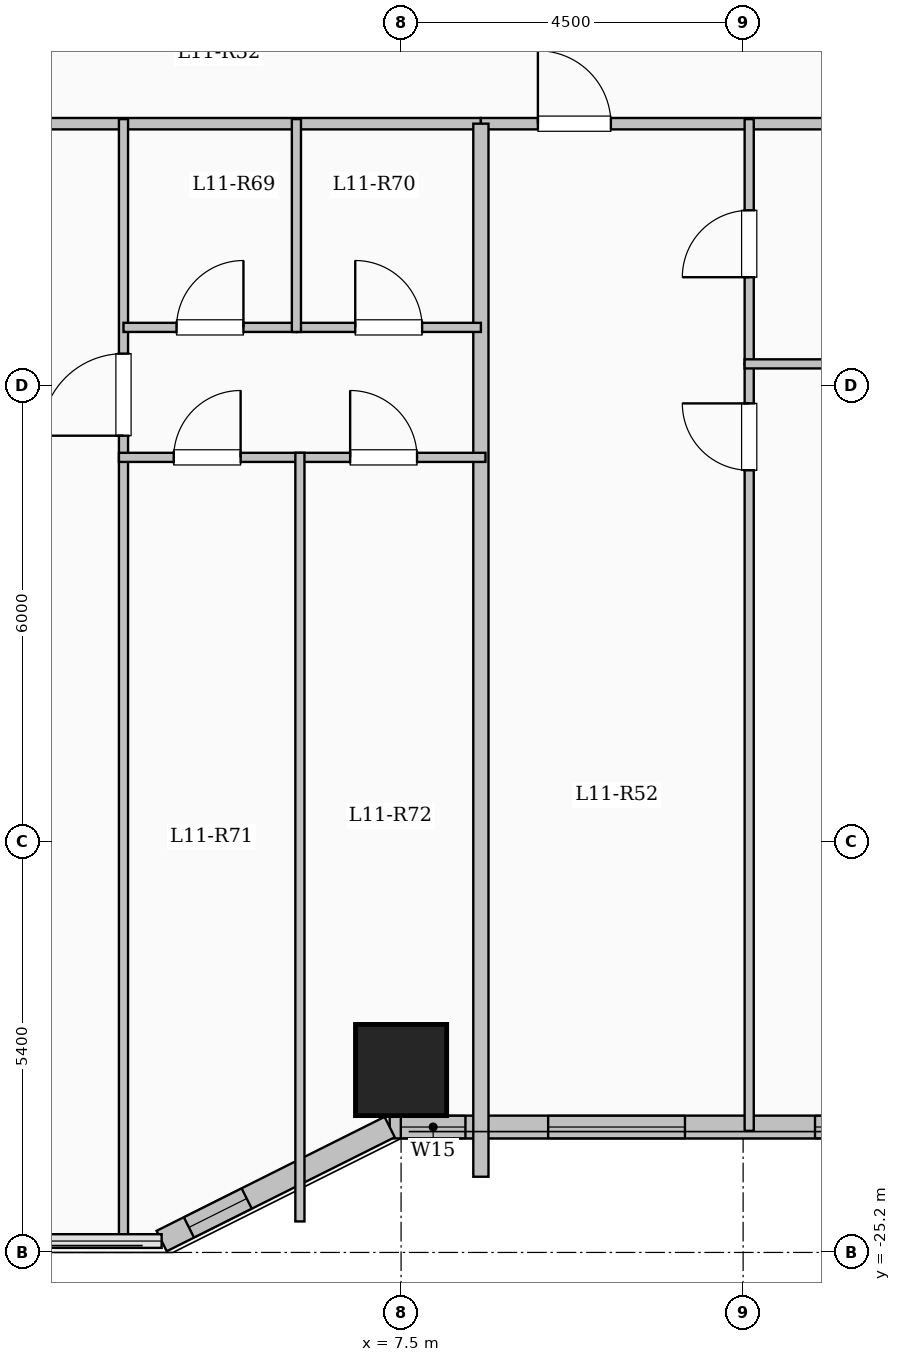
"""IFC4 building model, lengths in metres.
Left out: names, types, materials, properties, quantities, classifications, styles, units other than length and angle.
Written with IfcOpenShell. Run it as: python <this file> out.ifc"""

import sys

from ifc_helpers import new_model, si_unit, direction, frame, frame_2d, origin, origin_2d, place, context, subcontext, project, spatial, rectangle, extrude, element, fill, save


model = new_model("IFC4")
c1 = context("Model", 3, precision=1e-05, world=origin(), true_north=direction((0.0, 1.0)))
c2 = subcontext(c1, "Body", "Model", "MODEL_VIEW")
j1 = project(units=[si_unit("LENGTHUNIT", "METRE"), si_unit("PLANEANGLEUNIT", "RADIAN")], contexts=[c1])
p1 = place(None, origin())
s1 = spatial("IfcSite", under=j1, at=p1, CompositionType="ELEMENT")
p2 = place(p1, origin())
s2 = spatial("IfcBuilding", under=s1, at=p2, CompositionType="ELEMENT")
p3 = place(p2, frame((0.0, 0.0, 44.1)))
s3 = spatial("IfcBuildingStorey", under=s2, at=p3, CompositionType="ELEMENT", Elevation=44.1)
p4 = place(p3, frame((7.5, -22.8, 0.0), z_axis=(0.0, 0.0, 1.0), x_axis=(1.0, 0.0, 0.0)))
e1 = element("IfcColumn", 1, at=p4, inside=s3, PredefinedType="COLUMN", context=c2, shape_type="SweptSolid", body=[
    extrude(rectangle(XDim=1.2, YDim=1.2, at=origin_2d()), origin(), (0.0, 0.0, 1.0), 3.35),
])
p5 = place(p3, frame((22.65, -23.55, 0.0), z_axis=(0.0, 0.0, 1.0), x_axis=(-1.0, 0.0, 0.0)))
e2 = element("IfcWall", 2, at=p5, inside=s3, PredefinedType="SOLIDWALL", context=c2, shape_type="SweptSolid", body=[
    extrude(rectangle(XDim=15.3, YDim=0.3, at=frame_2d((7.65, 0.0))), origin(), (0.0, 0.0, 1.0), 3.1),
])
p6 = place(p5, frame((0.509, 0.0, 0.95)))
e3 = element("IfcOpeningElement", 3, at=p6, cuts=e2, PredefinedType="OPENING", context=c2, shape_type="SweptSolid", body=[
    extrude(rectangle(XDim=1.2, YDim=1.5, at=frame_2d((0.6, 0.75))), frame((0.0, 0.16, 0.0), z_axis=(0.0, -1.0, 0.0), x_axis=(1.0, 0.0, 0.0)), (0.0, 0.0, 1.0), 0.32),
])
p7 = place(p5, frame((2.585, 0.0, 0.95)))
e4 = element("IfcOpeningElement", 4, at=p7, cuts=e2, PredefinedType="OPENING", context=c2, shape_type="SweptSolid", body=[
    extrude(rectangle(XDim=1.2, YDim=1.5, at=frame_2d((0.6, 0.75))), frame((0.0, 0.16, 0.0), z_axis=(0.0, -1.0, 0.0), x_axis=(1.0, 0.0, 0.0)), (0.0, 0.0, 1.0), 0.32),
])
p8 = place(p5, frame((5.019, 0.0, 0.9)))
e5 = element("IfcOpeningElement", 5, at=p8, cuts=e2, PredefinedType="OPENING", context=c2, shape_type="SweptSolid", body=[
    extrude(rectangle(XDim=1.5, YDim=1.65, at=frame_2d((0.75, 0.825))), frame((0.0, 0.16, 0.0), z_axis=(0.0, -1.0, 0.0), x_axis=(1.0, 0.0, 0.0)), (0.0, 0.0, 1.0), 0.32),
])
p9 = place(p5, frame((8.204, 0.0, 0.9)))
e6 = element("IfcOpeningElement", 6, at=p9, cuts=e2, PredefinedType="OPENING", context=c2, shape_type="SweptSolid", body=[
    extrude(rectangle(XDim=1.5, YDim=1.65, at=frame_2d((0.75, 0.825))), frame((0.0, 0.16, 0.0), z_axis=(0.0, -1.0, 0.0), x_axis=(1.0, 0.0, 0.0)), (0.0, 0.0, 1.0), 0.32),
])
p10 = place(p5, frame((11.415, 0.0, 0.9)))
e7 = element("IfcOpeningElement", 7, at=p10, cuts=e2, PredefinedType="OPENING", context=c2, shape_type="SweptSolid", body=[
    extrude(rectangle(XDim=1.8, YDim=1.65, at=frame_2d((0.9, 0.825))), frame((0.0, 0.16, 0.0), z_axis=(0.0, -1.0, 0.0), x_axis=(1.0, 0.0, 0.0)), (0.0, 0.0, 1.0), 0.32),
])
p11 = place(p5, frame((14.303, 0.0, 0.95)))
e8 = element("IfcOpeningElement", 8, at=p11, cuts=e2, PredefinedType="OPENING", context=c2, shape_type="SweptSolid", body=[
    extrude(rectangle(XDim=0.85, YDim=1.5, at=frame_2d((0.425, 0.75))), frame((0.0, 0.16, 0.0), z_axis=(0.0, -1.0, 0.0), x_axis=(1.0, 0.0, 0.0)), (0.0, 0.0, 1.0), 0.32),
])
p12 = place(p3, frame((7.35, -23.55, 0.0), z_axis=(0.0, 0.0, 1.0), x_axis=(-0.894427191, -0.4472135955, 0.0)))
e9 = element("IfcWall", 9, at=p12, inside=s3, PredefinedType="SOLIDWALL", context=c2, shape_type="SweptSolid", body=[
    extrude(rectangle(XDim=3.354, YDim=0.3, at=frame_2d((1.677, 0.0))), origin(), (0.0, 0.0, 1.0), 3.1),
])
p13 = place(p12, frame((2.103, 0.0, 0.95)))
e10 = element("IfcOpeningElement", 10, at=p13, cuts=e9, PredefinedType="OPENING", context=c2, shape_type="SweptSolid", body=[
    extrude(rectangle(XDim=0.85, YDim=1.5, at=frame_2d((0.425, 0.75))), frame((0.0, 0.16, 0.0), z_axis=(0.0, -1.0, 0.0), x_axis=(1.0, 0.0, 0.0)), (0.0, 0.0, 1.0), 0.32),
])
p14 = place(p3, frame((-8.55, -10.35, 0.0), z_axis=(0.0, 0.0, 1.0), x_axis=(1.0, 0.0, 0.0)))
e11 = element("IfcWall", 11, at=p14, inside=s3, PredefinedType="PARTITIONING", context=c2, shape_type="SweptSolid", body=[
    extrude(rectangle(XDim=17.1, YDim=0.15, at=frame_2d((8.55, 0.0))), origin(), (0.0, 0.0, 1.0), 3.1),
])
p15 = place(p14, frame((0.8, 0.0, 0.0)))
e12 = element("IfcOpeningElement", 12, at=p15, cuts=e11, PredefinedType="OPENING", context=c2, shape_type="SweptSolid", body=[
    extrude(rectangle(XDim=0.96, YDim=2.15, at=frame_2d((0.48, 1.075))), frame((0.0, 0.085, 0.0), z_axis=(0.0, -1.0, 0.0), x_axis=(1.0, 0.0, 0.0)), (0.0, 0.0, 1.0), 0.17),
])
p16 = place(p14, frame((8.495, 0.0, 0.0)))
e13 = element("IfcOpeningElement", 13, at=p16, cuts=e11, PredefinedType="OPENING", context=c2, shape_type="SweptSolid", body=[
    extrude(rectangle(XDim=0.96, YDim=2.15, at=frame_2d((0.48, 1.075))), frame((0.0, 0.085, 0.0), z_axis=(0.0, -1.0, 0.0), x_axis=(1.0, 0.0, 0.0)), (0.0, 0.0, 1.0), 0.17),
])
p17 = place(p3, frame((8.55, -10.35, 0.0), z_axis=(0.0, 0.0, 1.0), x_axis=(1.0, 0.0, 0.0)))
e14 = element("IfcWall", 14, at=p17, inside=s3, PredefinedType="PARTITIONING", context=c2, shape_type="SweptSolid", body=[
    extrude(rectangle(XDim=14.0, YDim=0.15, at=frame_2d((7.0, 0.0))), origin(), (0.0, 0.0, 1.0), 3.1),
])
p18 = place(p17, frame((0.75, 0.0, 0.0)))
e15 = element("IfcOpeningElement", 15, at=p18, cuts=e14, PredefinedType="OPENING", context=c2, shape_type="SweptSolid", body=[
    extrude(rectangle(XDim=0.96, YDim=2.15, at=frame_2d((0.48, 1.075))), frame((0.0, 0.085, 0.0), z_axis=(0.0, -1.0, 0.0), x_axis=(1.0, 0.0, 0.0)), (0.0, 0.0, 1.0), 0.17),
])
p19 = place(p17, frame((7.446, 0.0, 0.0)))
e16 = element("IfcOpeningElement", 16, at=p19, cuts=e14, PredefinedType="OPENING", context=c2, shape_type="SweptSolid", body=[
    extrude(rectangle(XDim=0.96, YDim=2.15, at=frame_2d((0.48, 1.075))), frame((0.0, 0.085, 0.0), z_axis=(0.0, -1.0, 0.0), x_axis=(1.0, 0.0, 0.0)), (0.0, 0.0, 1.0), 0.17),
])
p20 = place(p3, frame((12.08, -23.6, 0.0), z_axis=(0.0, 0.0, 1.0), x_axis=(0.0, 1.0, 0.0)))
e17 = element("IfcWall", 17, at=p20, inside=s3, PredefinedType="PARTITIONING", context=c2, shape_type="SweptSolid", body=[
    extrude(rectangle(XDim=10.09, YDim=0.12, at=frame_2d((5.045, 0.0))), origin(), (0.0, 0.0, 1.0), 3.1),
])
p21 = place(p20, frame((8.69, 0.0, 0.0)))
e18 = element("IfcOpeningElement", 18, at=p21, cuts=e17, PredefinedType="OPENING", context=c2, shape_type="SweptSolid", body=[
    extrude(rectangle(XDim=0.88, YDim=2.1, at=frame_2d((0.44, 1.05))), frame((0.0, 0.07, 0.0), z_axis=(0.0, -1.0, 0.0), x_axis=(1.0, 0.0, 0.0)), (0.0, 0.0, 1.0), 0.14),
])
p22 = place(p3, frame((12.08, -13.51, 0.0), z_axis=(0.0, 0.0, 1.0), x_axis=(0.0, 1.0, 0.0)))
e19 = element("IfcWall", 19, at=p22, inside=s3, PredefinedType="PARTITIONING", context=c2, shape_type="SweptSolid", body=[
    extrude(rectangle(XDim=3.22, YDim=0.12, at=frame_2d((1.61, 0.0))), origin(), (0.0, 0.0, 1.0), 3.1),
])
p23 = place(p22, frame((1.14, 0.0, 0.0)))
e20 = element("IfcOpeningElement", 20, at=p23, cuts=e19, PredefinedType="OPENING", context=c2, shape_type="SweptSolid", body=[
    extrude(rectangle(XDim=0.88, YDim=2.1, at=frame_2d((0.44, 1.05))), frame((0.0, 0.07, 0.0), z_axis=(0.0, -1.0, 0.0), x_axis=(1.0, 0.0, 0.0)), (0.0, 0.0, 1.0), 0.14),
])
p24 = place(p3, frame((12.02, -13.51, 0.0), z_axis=(0.0, 0.0, 1.0), x_axis=(1.0, 0.0, 0.0)))
e21 = element("IfcWall", 21, at=p24, inside=s3, PredefinedType="PARTITIONING", context=c2, shape_type="SweptSolid", body=[
    extrude(rectangle(XDim=3.336, YDim=0.12, at=frame_2d((1.668, 0.0))), origin(), (0.0, 0.0, 1.0), 3.1),
])
p25 = place(p3, frame((8.55, -24.204, 0.0), z_axis=(0.0, 0.0, 1.0), x_axis=(0.0, 1.0, 0.0)))
e22 = element("IfcWall", 22, at=p25, inside=s3, PredefinedType="SOLIDWALL", context=c2, shape_type="SweptSolid", body=[
    extrude(rectangle(XDim=13.854, YDim=0.2, at=frame_2d((6.927, 0.0))), origin(), (0.0, 0.0, 1.0), 3.1),
])
p26 = place(p3, frame((3.848, -25.08, 0.0), z_axis=(0.0, 0.0, 1.0), x_axis=(0.0, 1.0, 0.0)))
e23 = element("IfcWall", 23, at=p26, inside=s3, PredefinedType="PARTITIONING", context=c2, shape_type="SweptSolid", body=[
    extrude(rectangle(XDim=14.79, YDim=0.12, at=frame_2d((7.395, 0.0))), origin(), (0.0, 0.0, 1.0), 3.1),
])
p27 = place(p26, frame((10.625, 0.0, 0.0)))
e24 = element("IfcOpeningElement", 24, at=p27, cuts=e23, PredefinedType="OPENING", context=c2, shape_type="SweptSolid", body=[
    extrude(rectangle(XDim=1.08, YDim=2.15, at=frame_2d((0.54, 1.075))), frame((0.0, 0.07, 0.0), z_axis=(0.0, -1.0, 0.0), x_axis=(1.0, 0.0, 0.0)), (0.0, 0.0, 1.0), 0.14),
])
p28 = place(p3, frame((3.848, -13.03, 0.0), z_axis=(0.0, 0.0, 1.0), x_axis=(1.0, 0.0, 0.0)))
e25 = element("IfcWall", 25, at=p28, inside=s3, PredefinedType="PARTITIONING", context=c2, shape_type="SweptSolid", body=[
    extrude(rectangle(XDim=2.275, YDim=0.12, at=frame_2d((1.138, 0.0))), origin(), (0.0, 0.0, 1.0), 2.585),
])
p29 = place(p28, frame((0.698, 0.0, 0.0)))
e26 = element("IfcOpeningElement", 26, at=p29, cuts=e25, PredefinedType="OPENING", context=c2, shape_type="SweptSolid", body=[
    extrude(rectangle(XDim=0.88, YDim=2.1, at=frame_2d((0.44, 1.05))), frame((0.0, 0.07, 0.0), z_axis=(0.0, -1.0, 0.0), x_axis=(1.0, 0.0, 0.0)), (0.0, 0.0, 1.0), 0.14),
])
p30 = place(p3, frame((6.123, -13.03, 0.0), z_axis=(0.0, 0.0, 1.0), x_axis=(1.0, 0.0, 0.0)))
e27 = element("IfcWall", 27, at=p30, inside=s3, PredefinedType="PARTITIONING", context=c2, shape_type="SweptSolid", body=[
    extrude(rectangle(XDim=2.427, YDim=0.12, at=frame_2d((1.213, 0.0))), origin(), (0.0, 0.0, 1.0), 2.585),
])
p31 = place(p30, frame((0.774, 0.0, 0.0)))
e28 = element("IfcOpeningElement", 28, at=p31, cuts=e27, PredefinedType="OPENING", context=c2, shape_type="SweptSolid", body=[
    extrude(rectangle(XDim=0.88, YDim=2.1, at=frame_2d((0.44, 1.05))), frame((0.0, 0.07, 0.0), z_axis=(0.0, -1.0, 0.0), x_axis=(1.0, 0.0, 0.0)), (0.0, 0.0, 1.0), 0.14),
])
p32 = place(p3, frame((3.788, -14.74, 0.0), z_axis=(0.0, 0.0, 1.0), x_axis=(1.0, 0.0, 0.0)))
e29 = element("IfcWall", 29, at=p32, inside=s3, PredefinedType="PARTITIONING", context=c2, shape_type="SweptSolid", body=[
    extrude(rectangle(XDim=4.822, YDim=0.12, at=frame_2d((2.411, 0.0))), origin(), (0.0, 0.0, 1.0), 2.585),
])
p33 = place(p32, frame((0.721, 0.0, 0.0)))
e30 = element("IfcOpeningElement", 30, at=p33, cuts=e29, PredefinedType="OPENING", context=c2, shape_type="SweptSolid", body=[
    extrude(rectangle(XDim=0.88, YDim=2.1, at=frame_2d((0.44, 1.05))), frame((0.0, 0.07, 0.0), z_axis=(0.0, -1.0, 0.0), x_axis=(1.0, 0.0, 0.0)), (0.0, 0.0, 1.0), 0.14),
])
p34 = place(p32, frame((3.042, 0.0, 0.0)))
e31 = element("IfcOpeningElement", 31, at=p34, cuts=e29, PredefinedType="OPENING", context=c2, shape_type="SweptSolid", body=[
    extrude(rectangle(XDim=0.88, YDim=2.1, at=frame_2d((0.44, 1.05))), frame((0.0, 0.07, 0.0), z_axis=(0.0, -1.0, 0.0), x_axis=(1.0, 0.0, 0.0)), (0.0, 0.0, 1.0), 0.14),
])
p35 = place(p3, frame((6.123, -13.09, 0.0), z_axis=(0.0, 0.0, 1.0), x_axis=(0.0, 1.0, 0.0)))
e32 = element("IfcWall", 32, at=p35, inside=s3, PredefinedType="PARTITIONING", context=c2, shape_type="SweptSolid", body=[
    extrude(rectangle(XDim=2.8, YDim=0.12, at=frame_2d((1.4, 0.0))), origin(), (0.0, 0.0, 1.0), 3.1),
])
p36 = place(p3, frame((6.169, -24.792, 0.0), z_axis=(0.0, 0.0, 1.0), x_axis=(0.0, 1.0, 0.0)))
e33 = element("IfcWall", 33, at=p36, inside=s3, PredefinedType="PARTITIONING", context=c2, shape_type="SweptSolid", body=[
    extrude(rectangle(XDim=10.112, YDim=0.12, at=frame_2d((5.056, 0.0))), origin(), (0.0, 0.0, 1.0), 3.1),
])
p37 = place(p9, origin())
e34 = element("IfcWindow", 34, at=p37, inside=s3, PartitioningType="SINGLE_PANEL", PredefinedType="WINDOW", context=c2, shape_type="SweptSolid", body=[
    extrude(rectangle(XDim=1.5, YDim=1.65, at=frame_2d((0.75, 0.825))), frame((0.0, 0.03, 0.0), z_axis=(0.0, -1.0, 0.0), x_axis=(1.0, 0.0, 0.0)), (0.0, 0.0, 1.0), 0.06),
])
fill(e6, e34)
p38 = place(p10, origin())
e35 = element("IfcWindow", 35, at=p38, inside=s3, PartitioningType="SINGLE_PANEL", PredefinedType="WINDOW", context=c2, shape_type="SweptSolid", body=[
    extrude(rectangle(XDim=1.8, YDim=1.65, at=frame_2d((0.9, 0.825))), frame((0.0, 0.03, 0.0), z_axis=(0.0, -1.0, 0.0), x_axis=(1.0, 0.0, 0.0)), (0.0, 0.0, 1.0), 0.06),
])
fill(e7, e35)
p39 = place(p11, origin())
e36 = element("IfcWindow", 36, at=p39, inside=s3, PartitioningType="SINGLE_PANEL", PredefinedType="WINDOW", context=c2, shape_type="SweptSolid", body=[
    extrude(rectangle(XDim=0.85, YDim=1.5, at=frame_2d((0.425, 0.75))), frame((0.0, 0.03, 0.0), z_axis=(0.0, -1.0, 0.0), x_axis=(1.0, 0.0, 0.0)), (0.0, 0.0, 1.0), 0.06),
])
fill(e8, e36)
p40 = place(p13, origin())
e37 = element("IfcWindow", 37, at=p40, inside=s3, PartitioningType="SINGLE_PANEL", PredefinedType="WINDOW", context=c2, shape_type="SweptSolid", body=[
    extrude(rectangle(XDim=0.85, YDim=1.5, at=frame_2d((0.425, 0.75))), frame((0.0, 0.03, 0.0), z_axis=(0.0, -1.0, 0.0), x_axis=(1.0, 0.0, 0.0)), (0.0, 0.0, 1.0), 0.06),
])
fill(e10, e37)
p41 = place(p18, origin())
e38 = element("IfcDoor", 38, at=p41, inside=s3, OperationType="SINGLE_SWING_LEFT", PredefinedType="DOOR", context=c2, shape_type="SweptSolid", body=[
    extrude(rectangle(XDim=0.96, YDim=2.15, at=frame_2d((0.48, 1.075))), frame((0.0, 0.025, 0.0), z_axis=(0.0, -1.0, 0.0), x_axis=(1.0, 0.0, 0.0)), (0.0, 0.0, 1.0), 0.05),
])
fill(e15, e38)
p42 = place(p21, origin())
e39 = element("IfcDoor", 39, at=p42, inside=s3, OperationType="SINGLE_SWING_RIGHT", PredefinedType="DOOR", context=c2, shape_type="SweptSolid", body=[
    extrude(rectangle(XDim=0.88, YDim=2.1, at=frame_2d((0.44, 1.05))), frame((0.0, 0.025, 0.0), z_axis=(0.0, -1.0, 0.0), x_axis=(1.0, 0.0, 0.0)), (0.0, 0.0, 1.0), 0.05),
])
fill(e18, e39)
p43 = place(p23, origin())
e40 = element("IfcDoor", 40, at=p43, inside=s3, OperationType="SINGLE_SWING_LEFT", PredefinedType="DOOR", context=c2, shape_type="SweptSolid", body=[
    extrude(rectangle(XDim=0.88, YDim=2.1, at=frame_2d((0.44, 1.05))), frame((0.0, 0.025, 0.0), z_axis=(0.0, -1.0, 0.0), x_axis=(1.0, 0.0, 0.0)), (0.0, 0.0, 1.0), 0.05),
])
fill(e20, e40)
p44 = place(p27, origin())
e41 = element("IfcDoor", 41, at=p44, inside=s3, OperationType="SINGLE_SWING_LEFT", PredefinedType="DOOR", context=c2, shape_type="SweptSolid", body=[
    extrude(rectangle(XDim=1.08, YDim=2.15, at=frame_2d((0.54, 1.075))), frame((0.0, 0.025, 0.0), z_axis=(0.0, -1.0, 0.0), x_axis=(1.0, 0.0, 0.0)), (0.0, 0.0, 1.0), 0.05),
])
fill(e24, e41)
p45 = place(p29, origin())
e42 = element("IfcDoor", 42, at=p45, inside=s3, OperationType="SINGLE_SWING_RIGHT", PredefinedType="DOOR", context=c2, shape_type="SweptSolid", body=[
    extrude(rectangle(XDim=0.88, YDim=2.1, at=frame_2d((0.44, 1.05))), frame((0.0, 0.025, 0.0), z_axis=(0.0, -1.0, 0.0), x_axis=(1.0, 0.0, 0.0)), (0.0, 0.0, 1.0), 0.05),
])
fill(e26, e42)
p46 = place(p31, origin())
e43 = element("IfcDoor", 43, at=p46, inside=s3, OperationType="SINGLE_SWING_LEFT", PredefinedType="DOOR", context=c2, shape_type="SweptSolid", body=[
    extrude(rectangle(XDim=0.88, YDim=2.1, at=frame_2d((0.44, 1.05))), frame((0.0, 0.025, 0.0), z_axis=(0.0, -1.0, 0.0), x_axis=(1.0, 0.0, 0.0)), (0.0, 0.0, 1.0), 0.05),
])
fill(e28, e43)
p47 = place(p33, origin())
e44 = element("IfcDoor", 44, at=p47, inside=s3, OperationType="SINGLE_SWING_RIGHT", PredefinedType="DOOR", context=c2, shape_type="SweptSolid", body=[
    extrude(rectangle(XDim=0.88, YDim=2.1, at=frame_2d((0.44, 1.05))), frame((0.0, 0.025, 0.0), z_axis=(0.0, -1.0, 0.0), x_axis=(1.0, 0.0, 0.0)), (0.0, 0.0, 1.0), 0.05),
])
fill(e30, e44)
p48 = place(p34, origin())
e45 = element("IfcDoor", 45, at=p48, inside=s3, OperationType="SINGLE_SWING_LEFT", PredefinedType="DOOR", context=c2, shape_type="SweptSolid", body=[
    extrude(rectangle(XDim=0.88, YDim=2.1, at=frame_2d((0.44, 1.05))), frame((0.0, 0.025, 0.0), z_axis=(0.0, -1.0, 0.0), x_axis=(1.0, 0.0, 0.0)), (0.0, 0.0, 1.0), 0.05),
])
fill(e31, e45)
save(model, sys.argv[1])
